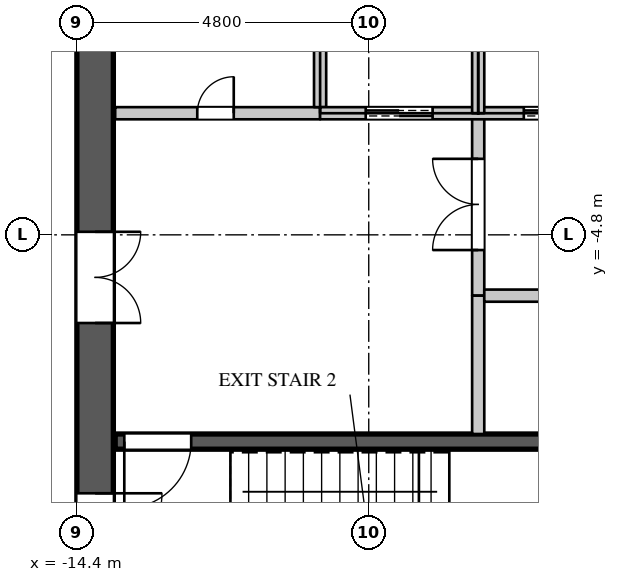
"""IFC4 building model, lengths in metres.
Left out: names, types, materials, properties, quantities, classifications, styles, units other than length and angle.
Written with IfcOpenShell. Run it as: python <this file> out.ifc"""

import sys

from ifc_helpers import new_model, si_unit, direction, frame, frame_2d, origin, place, context, subcontext, project, spatial, rectangle, extrude, element, fill, save


model = new_model("IFC4")
c1 = context("Model", 3, precision=1e-05, world=origin(), true_north=direction((0.0, 1.0)))
c2 = subcontext(c1, "Body", "Model", "MODEL_VIEW")
j1 = project(units=[si_unit("LENGTHUNIT", "METRE"), si_unit("PLANEANGLEUNIT", "RADIAN")], contexts=[c1])
p1 = place(None, origin())
s1 = spatial("IfcSite", under=j1, at=p1, CompositionType="ELEMENT")
p2 = place(p1, origin())
s2 = spatial("IfcBuilding", under=s1, at=p2, CompositionType="ELEMENT")
p3 = place(p2, frame((0.0, 0.0, 293.7)))
s3 = spatial("IfcBuildingStorey", under=s2, at=p3, CompositionType="ELEMENT", Elevation=293.7)
p4 = place(p3, frame((-14.1, -11.4, 0.0), z_axis=(0.0, 0.0, 1.0), x_axis=(0.0, 1.0, 0.0)))
e1 = element("IfcWall", 1, at=p4, inside=s3, PredefinedType="SHEAR", context=c2, shape_type="SweptSolid", body=[
    extrude(rectangle(XDim=22.8, YDim=0.6, at=frame_2d((11.4, 0.0))), origin(), (0.0, 0.0, 1.0), 4.2),
])
p5 = place(p4, frame((20.45, 0.0, 0.0)))
e2 = element("IfcOpeningElement", 2, at=p5, cuts=e1, PredefinedType="OPENING", context=c2, shape_type="SweptSolid", body=[
    extrude(rectangle(XDim=1.1, YDim=2.2, at=frame_2d((0.55, 1.1))), frame((0.0, 0.31, 0.0), z_axis=(0.0, -1.0, 0.0), x_axis=(1.0, 0.0, 0.0)), (0.0, 0.0, 1.0), 0.62),
])
p6 = place(p4, frame((1.25, 0.0, 0.0)))
e3 = element("IfcOpeningElement", 3, at=p6, cuts=e1, PredefinedType="OPENING", context=c2, shape_type="SweptSolid", body=[
    extrude(rectangle(XDim=1.1, YDim=2.2, at=frame_2d((0.55, 1.1))), frame((0.0, 0.31, 0.0), z_axis=(0.0, -1.0, 0.0), x_axis=(1.0, 0.0, 0.0)), (0.0, 0.0, 1.0), 0.62),
])
p7 = place(p4, frame((16.15, 0.0, 0.0)))
e4 = element("IfcOpeningElement", 4, at=p7, cuts=e1, PredefinedType="OPENING", context=c2, shape_type="SweptSolid", body=[
    extrude(rectangle(XDim=1.5, YDim=2.4, at=frame_2d((0.75, 1.2))), frame((0.0, 0.31, 0.0), z_axis=(0.0, -1.0, 0.0), x_axis=(1.0, 0.0, 0.0)), (0.0, 0.0, 1.0), 0.62),
])
p8 = place(p4, frame((5.15, 0.0, 0.0)))
e5 = element("IfcOpeningElement", 5, at=p8, cuts=e1, PredefinedType="OPENING", context=c2, shape_type="SweptSolid", body=[
    extrude(rectangle(XDim=1.5, YDim=2.4, at=frame_2d((0.75, 1.2))), frame((0.0, 0.31, 0.0), z_axis=(0.0, -1.0, 0.0), x_axis=(1.0, 0.0, 0.0)), (0.0, 0.0, 1.0), 0.62),
])
p9 = place(p3, frame((-7.8, -5.8, 0.0), z_axis=(0.0, 0.0, 1.0), x_axis=(0.0, 1.0, 0.0)))
e6 = element("IfcWall", 6, at=p9, inside=s3, PredefinedType="PARTITIONING", context=c2, shape_type="SweptSolid", body=[
    extrude(rectangle(XDim=3.0, YDim=0.2, at=frame_2d((1.5, 0.0))), origin(), (0.0, 0.0, 1.0), 3.95),
])
p10 = place(p9, frame((0.75, 0.0, 0.0)))
e7 = element("IfcOpeningElement", 7, at=p10, cuts=e6, PredefinedType="OPENING", context=c2, shape_type="SweptSolid", body=[
    extrude(rectangle(XDim=1.5, YDim=2.4, at=frame_2d((0.75, 1.2))), frame((0.0, 0.11, 0.0), z_axis=(0.0, -1.0, 0.0), x_axis=(1.0, 0.0, 0.0)), (0.0, 0.0, 1.0), 0.22),
])
p11 = place(p3, frame((-13.77, -2.8, 0.0), z_axis=(0.0, 0.0, 1.0), x_axis=(1.0, 0.0, 0.0)))
e8 = element("IfcWall", 8, at=p11, inside=s3, PredefinedType="PARTITIONING", context=c2, shape_type="SweptSolid", body=[
    extrude(rectangle(XDim=3.37, YDim=0.2, at=frame_2d((1.685, 0.0))), origin(), (0.0, 0.0, 1.0), 3.95),
])
p12 = place(p11, frame((1.35, 0.0, 0.0)))
e9 = element("IfcOpeningElement", 9, at=p12, cuts=e8, PredefinedType="OPENING", context=c2, shape_type="SweptSolid", body=[
    extrude(rectangle(XDim=0.6, YDim=2.0, at=frame_2d((0.3, 1.0))), frame((0.0, 0.11, 0.0), z_axis=(0.0, -1.0, 0.0), x_axis=(1.0, 0.0, 0.0)), (0.0, 0.0, 1.0), 0.22),
])
p13 = place(p3, frame((-7.8, -8.075, 0.0), z_axis=(0.0, 0.0, 1.0), x_axis=(0.0, 1.0, 0.0)))
e10 = element("IfcWall", 10, at=p13, inside=s3, PredefinedType="PARTITIONING", context=c2, shape_type="SweptSolid", body=[
    extrude(rectangle(XDim=2.275, YDim=0.2, at=frame_2d((1.137, 0.0))), origin(), (0.0, 0.0, 1.0), 3.95),
])
p14 = place(p3, frame((-7.7, -5.8, 0.0), z_axis=(0.0, 0.0, 1.0), x_axis=(1.0, 0.0, 0.0)))
e11 = element("IfcWall", 11, at=p14, inside=s3, PredefinedType="PARTITIONING", context=c2, shape_type="SweptSolid", body=[
    extrude(rectangle(XDim=5.48, YDim=0.2, at=frame_2d((2.74, 0.0))), origin(), (0.0, 0.0, 1.0), 3.95),
])
p15 = place(p14, frame((2.3, 0.0, 0.0)))
e12 = element("IfcOpeningElement", 12, at=p15, cuts=e11, PredefinedType="OPENING", context=c2, shape_type="SweptSolid", body=[
    extrude(rectangle(XDim=0.9, YDim=2.2, at=frame_2d((0.45, 1.1))), frame((0.0, 0.11, 0.0), z_axis=(0.0, -1.0, 0.0), x_axis=(1.0, 0.0, 0.0)), (0.0, 0.0, 1.0), 0.22),
])
p16 = place(p3, frame((-10.4, -2.7, 0.0), z_axis=(0.0, 0.0, 1.0), x_axis=(0.0, 1.0, 0.0)))
e13 = element("IfcWall", 13, at=p16, inside=s3, PredefinedType="PARTITIONING", context=c2, shape_type="SweptSolid", body=[
    extrude(rectangle(XDim=2.7, YDim=0.2, at=frame_2d((1.35, 0.0))), origin(), (0.0, 0.0, 1.0), 3.95),
])
p17 = place(p3, frame((-10.4, -2.8, 0.0), z_axis=(0.0, 0.0, 1.0), x_axis=(1.0, 0.0, 0.0)))
e14 = element("IfcWall", 14, at=p17, inside=s3, PredefinedType="PARTITIONING", context=c2, shape_type="SweptSolid", body=[
    extrude(rectangle(XDim=18.2, YDim=0.2, at=frame_2d((9.1, 0.0))), origin(), (0.0, 0.0, 1.0), 3.95),
])
p18 = place(p17, frame((0.75, 0.0, 0.0)))
e15 = element("IfcOpeningElement", 15, at=p18, cuts=e14, PredefinedType="OPENING", context=c2, shape_type="SweptSolid", body=[
    extrude(rectangle(XDim=1.1, YDim=2.2, at=frame_2d((0.55, 1.1))), frame((0.0, 0.11, 0.0), z_axis=(0.0, -1.0, 0.0), x_axis=(1.0, 0.0, 0.0)), (0.0, 0.0, 1.0), 0.22),
])
p19 = place(p17, frame((3.35, 0.0, 0.0)))
e16 = element("IfcOpeningElement", 16, at=p19, cuts=e14, PredefinedType="OPENING", context=c2, shape_type="SweptSolid", body=[
    extrude(rectangle(XDim=1.1, YDim=2.2, at=frame_2d((0.55, 1.1))), frame((0.0, 0.11, 0.0), z_axis=(0.0, -1.0, 0.0), x_axis=(1.0, 0.0, 0.0)), (0.0, 0.0, 1.0), 0.22),
])
p20 = place(p17, frame((5.95, 0.0, 0.0)))
e17 = element("IfcOpeningElement", 17, at=p20, cuts=e14, PredefinedType="OPENING", context=c2, shape_type="SweptSolid", body=[
    extrude(rectangle(XDim=1.1, YDim=2.2, at=frame_2d((0.55, 1.1))), frame((0.0, 0.11, 0.0), z_axis=(0.0, -1.0, 0.0), x_axis=(1.0, 0.0, 0.0)), (0.0, 0.0, 1.0), 0.22),
])
p21 = place(p17, frame((8.55, 0.0, 0.0)))
e18 = element("IfcOpeningElement", 18, at=p21, cuts=e14, PredefinedType="OPENING", context=c2, shape_type="SweptSolid", body=[
    extrude(rectangle(XDim=1.1, YDim=2.2, at=frame_2d((0.55, 1.1))), frame((0.0, 0.11, 0.0), z_axis=(0.0, -1.0, 0.0), x_axis=(1.0, 0.0, 0.0)), (0.0, 0.0, 1.0), 0.22),
])
p22 = place(p17, frame((11.15, 0.0, 0.0)))
e19 = element("IfcOpeningElement", 19, at=p22, cuts=e14, PredefinedType="OPENING", context=c2, shape_type="SweptSolid", body=[
    extrude(rectangle(XDim=1.1, YDim=2.2, at=frame_2d((0.55, 1.1))), frame((0.0, 0.11, 0.0), z_axis=(0.0, -1.0, 0.0), x_axis=(1.0, 0.0, 0.0)), (0.0, 0.0, 1.0), 0.22),
])
p23 = place(p17, frame((13.75, 0.0, 0.0)))
e20 = element("IfcOpeningElement", 20, at=p23, cuts=e14, PredefinedType="OPENING", context=c2, shape_type="SweptSolid", body=[
    extrude(rectangle(XDim=1.1, YDim=2.2, at=frame_2d((0.55, 1.1))), frame((0.0, 0.11, 0.0), z_axis=(0.0, -1.0, 0.0), x_axis=(1.0, 0.0, 0.0)), (0.0, 0.0, 1.0), 0.22),
])
p24 = place(p17, frame((16.35, 0.0, 0.0)))
e21 = element("IfcOpeningElement", 21, at=p24, cuts=e14, PredefinedType="OPENING", context=c2, shape_type="SweptSolid", body=[
    extrude(rectangle(XDim=1.1, YDim=2.2, at=frame_2d((0.55, 1.1))), frame((0.0, 0.11, 0.0), z_axis=(0.0, -1.0, 0.0), x_axis=(1.0, 0.0, 0.0)), (0.0, 0.0, 1.0), 0.22),
])
p25 = place(p3, frame((-7.8, -2.8, 0.0), z_axis=(0.0, 0.0, 1.0), x_axis=(0.0, 1.0, 0.0)))
e22 = element("IfcWall", 22, at=p25, inside=s3, PredefinedType="PARTITIONING", context=c2, shape_type="SweptSolid", body=[
    extrude(rectangle(XDim=2.8, YDim=0.2, at=frame_2d((1.4, 0.0))), origin(), (0.0, 0.0, 1.0), 3.95),
])
p26 = place(p3, frame((-13.77, -8.2, 0.0), z_axis=(0.0, 0.0, 1.0), x_axis=(1.0, 0.0, 0.0)))
e23 = element("IfcWall", 23, at=p26, inside=s3, PredefinedType="SHEAR", context=c2, shape_type="SweptSolid", body=[
    extrude(rectangle(XDim=8.495, YDim=0.25, at=frame_2d((4.248, 0.0))), origin(), (0.0, 0.0, 1.0), 3.95),
])
p27 = place(p26, frame((0.15, 0.0, 0.0)))
e24 = element("IfcOpeningElement", 24, at=p27, cuts=e23, PredefinedType="OPENING", context=c2, shape_type="SweptSolid", body=[
    extrude(rectangle(XDim=1.1, YDim=2.2, at=frame_2d((0.55, 1.1))), frame((0.0, 0.135, 0.0), z_axis=(0.0, -1.0, 0.0), x_axis=(1.0, 0.0, 0.0)), (0.0, 0.0, 1.0), 0.27),
])
p28 = place(p12, origin())
e25 = element("IfcDoor", 25, at=p28, inside=s3, OperationType="SINGLE_SWING_RIGHT", PredefinedType="DOOR", context=c2, shape_type="SweptSolid", body=[
    extrude(rectangle(XDim=0.6, YDim=2.0, at=frame_2d((0.3, 1.0))), frame((0.0, 0.025, 0.0), z_axis=(0.0, -1.0, 0.0), x_axis=(1.0, 0.0, 0.0)), (0.0, 0.0, 1.0), 0.05),
])
fill(e9, e25)
p29 = place(p18, origin())
e26 = element("IfcDoor", 26, at=p29, inside=s3, OperationType="DOUBLE_DOOR_SLIDING", PredefinedType="DOOR", context=c2, shape_type="SweptSolid", body=[
    extrude(rectangle(XDim=1.1, YDim=2.2, at=frame_2d((0.55, 1.1))), frame((0.0, 0.025, 0.0), z_axis=(0.0, -1.0, 0.0), x_axis=(1.0, 0.0, 0.0)), (0.0, 0.0, 1.0), 0.05),
])
fill(e15, e26)
p30 = place(p19, origin())
e27 = element("IfcDoor", 27, at=p30, inside=s3, OperationType="DOUBLE_DOOR_SLIDING", PredefinedType="DOOR", context=c2, shape_type="SweptSolid", body=[
    extrude(rectangle(XDim=1.1, YDim=2.2, at=frame_2d((0.55, 1.1))), frame((0.0, 0.025, 0.0), z_axis=(0.0, -1.0, 0.0), x_axis=(1.0, 0.0, 0.0)), (0.0, 0.0, 1.0), 0.05),
])
fill(e16, e27)
p31 = place(p27, origin())
e28 = element("IfcDoor", 28, at=p31, inside=s3, OperationType="SINGLE_SWING_RIGHT", PredefinedType="DOOR", context=c2, shape_type="SweptSolid", body=[
    extrude(rectangle(XDim=1.1, YDim=2.2, at=frame_2d((0.55, 1.1))), frame((0.0, 0.025, 0.0), z_axis=(0.0, -1.0, 0.0), x_axis=(1.0, 0.0, 0.0)), (0.0, 0.0, 1.0), 0.05),
])
fill(e24, e28)
p32 = place(p10, origin())
e29 = element("IfcDoor", 29, at=p32, inside=s3, OperationType="DOUBLE_DOOR_SINGLE_SWING", PredefinedType="DOOR", context=c2, shape_type="SweptSolid", body=[
    extrude(rectangle(XDim=1.5, YDim=2.4, at=frame_2d((0.75, 1.2))), frame((0.0, 0.025, 0.0), z_axis=(0.0, -1.0, 0.0), x_axis=(1.0, 0.0, 0.0)), (0.0, 0.0, 1.0), 0.05),
])
fill(e7, e29)
p33 = place(p6, origin())
e30 = element("IfcDoor", 30, at=p33, inside=s3, OperationType="SINGLE_SWING_LEFT", PredefinedType="DOOR", context=c2, shape_type="SweptSolid", body=[
    extrude(rectangle(XDim=1.1, YDim=2.2, at=frame_2d((0.55, 1.1))), frame((0.0, -0.245, 0.0), z_axis=(0.0, -1.0, 0.0), x_axis=(1.0, 0.0, 0.0)), (0.0, 0.0, 1.0), 0.05),
])
fill(e3, e30)
p34 = place(p8, origin())
e31 = element("IfcDoor", 31, at=p34, inside=s3, OperationType="DOUBLE_DOOR_SINGLE_SWING", PredefinedType="DOOR", context=c2, shape_type="SweptSolid", body=[
    extrude(rectangle(XDim=1.5, YDim=2.4, at=frame_2d((0.75, 1.2))), frame((0.0, -0.245, 0.0), z_axis=(0.0, -1.0, 0.0), x_axis=(1.0, 0.0, 0.0)), (0.0, 0.0, 1.0), 0.05),
])
fill(e5, e31)
save(model, sys.argv[1])
